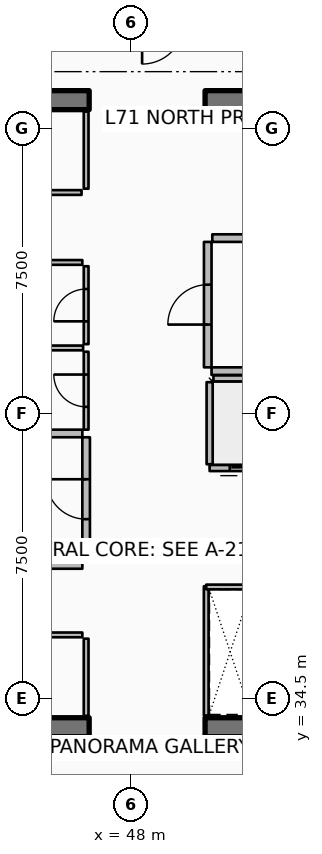
"""IFC4 building model, lengths in metres.
Left out: names, types, materials, properties, quantities, classifications, styles, units other than length and angle.
Written with IfcOpenShell. Run it as: python <this file> out.ifc"""

import sys

from ifc_helpers import new_model, si_unit, direction, frame, frame_2d, origin, place, context, subcontext, project, spatial, rectangle, extrude, element, fill, save


model = new_model("IFC4")
c1 = context("Model", 3, precision=1e-05, world=origin(), true_north=direction((0.0, 1.0)))
c2 = subcontext(c1, "Body", "Model", "MODEL_VIEW")
j1 = project(units=[si_unit("LENGTHUNIT", "METRE"), si_unit("PLANEANGLEUNIT", "RADIAN")], contexts=[c1])
p1 = place(None, origin())
s1 = spatial("IfcSite", under=j1, at=p1, CompositionType="ELEMENT")
p2 = place(p1, origin())
s2 = spatial("IfcBuilding", under=s1, at=p2, CompositionType="ELEMENT")
p3 = place(p2, frame((0.0, 0.0, 282.9)))
s3 = spatial("IfcBuildingStorey", under=s2, at=p3, CompositionType="ELEMENT", Elevation=282.9)
p4 = place(p3, frame((37.3, 33.75, 0.0), z_axis=(0.0, 0.0, 1.0), x_axis=(1.0, 0.0, 0.0)))
e1 = element("IfcWall", 1, at=p4, inside=s3, PredefinedType="SHEAR", context=c2, shape_type="SweptSolid", body=[
    extrude(rectangle(XDim=9.6, YDim=0.5, at=frame_2d((4.8, 0.0))), origin(), (0.0, 0.0, 1.0), 3.85),
])
p5 = place(p3, frame((49.95, 33.75, 0.0), z_axis=(0.0, 0.0, 1.0), x_axis=(1.0, 0.0, 0.0)))
e2 = element("IfcWall", 2, at=p5, inside=s3, PredefinedType="SHEAR", context=c2, shape_type="SweptSolid", body=[
    extrude(rectangle(XDim=9.6, YDim=0.5, at=frame_2d((4.8, 0.0))), origin(), (0.0, 0.0, 1.0), 3.85),
])
p6 = place(p3, frame((37.3, 50.25, 0.0), z_axis=(0.0, 0.0, 1.0), x_axis=(1.0, 0.0, 0.0)))
e3 = element("IfcWall", 3, at=p6, inside=s3, PredefinedType="SHEAR", context=c2, shape_type="SweptSolid", body=[
    extrude(rectangle(XDim=9.6, YDim=0.5, at=frame_2d((4.8, 0.0))), origin(), (0.0, 0.0, 1.0), 3.85),
])
p7 = place(p3, frame((49.95, 50.25, 0.0), z_axis=(0.0, 0.0, 1.0), x_axis=(1.0, 0.0, 0.0)))
e4 = element("IfcWall", 4, at=p7, inside=s3, PredefinedType="SHEAR", context=c2, shape_type="SweptSolid", body=[
    extrude(rectangle(XDim=9.6, YDim=0.5, at=frame_2d((4.8, 0.0))), origin(), (0.0, 0.0, 1.0), 3.85),
])
p8 = place(p3, frame((52.23, 40.57, 0.0), z_axis=(0.0, 0.0, 1.0), x_axis=(-1.0, 0.0, 0.0)))
e5 = element("IfcWall", 5, at=p8, inside=s3, PredefinedType="PARTITIONING", context=c2, shape_type="SweptSolid", body=[
    extrude(rectangle(XDim=2.16, YDim=0.16, at=frame_2d((1.08, 0.0))), origin(), (0.0, 0.0, 1.0), 3.59),
])
p9 = place(p8, frame((0.53, 0.0, 0.0)))
e6 = element("IfcOpeningElement", 6, at=p9, cuts=e5, PredefinedType="OPENING", context=c2, shape_type="SweptSolid", body=[
    extrude(rectangle(XDim=1.1, YDim=2.1, at=frame_2d((0.55, 1.05))), frame((0.0, 0.09, 0.0), z_axis=(0.0, -1.0, 0.0), x_axis=(1.0, 0.0, 0.0)), (0.0, 0.0, 1.0), 0.18),
])
p10 = place(p3, frame((50.07, 40.67, 0.0), z_axis=(0.0, 0.0, 1.0), x_axis=(0.0, 1.0, 0.0)))
e7 = element("IfcWall", 7, at=p10, inside=s3, PredefinedType="PARTITIONING", context=c2, shape_type="SweptSolid", body=[
    extrude(rectangle(XDim=2.16, YDim=0.16, at=frame_2d((1.08, 0.0))), origin(), (0.0, 0.0, 1.0), 3.59),
])
p11 = place(p3, frame((50.17, 42.93, 0.0), z_axis=(0.0, 0.0, 1.0), x_axis=(1.0, 0.0, 0.0)))
e8 = element("IfcWall", 8, at=p11, inside=s3, PredefinedType="PARTITIONING", context=c2, shape_type="SweptSolid", body=[
    extrude(rectangle(XDim=1.96, YDim=0.16, at=frame_2d((0.98, 0.0))), origin(), (0.0, 0.0, 1.0), 3.59),
])
p12 = place(p3, frame((46.82, 34.05, 0.0), z_axis=(0.0, 0.0, 1.0), x_axis=(0.0, 1.0, 0.0)))
e9 = element("IfcWall", 9, at=p12, inside=s3, PredefinedType="PARTITIONING", context=c2, shape_type="SweptSolid", body=[
    extrude(rectangle(XDim=2.03, YDim=0.125, at=frame_2d((1.015, 0.0))), origin(), (0.0, 0.0, 1.0), 3.03),
])
p13 = place(p3, frame((42.6, 36.18, 0.0), z_axis=(0.0, 0.0, 1.0), x_axis=(1.0, 0.0, 0.0)))
e10 = element("IfcWall", 10, at=p13, inside=s3, PredefinedType="PARTITIONING", context=c2, shape_type="SweptSolid", body=[
    extrude(rectangle(XDim=4.12, YDim=0.125, at=frame_2d((2.06, 0.0))), origin(), (0.0, 0.0, 1.0), 3.03),
])
p14 = place(p13, frame((1.635, 0.0, 0.0)))
e11 = element("IfcOpeningElement", 11, at=p14, cuts=e10, PredefinedType="OPENING", context=c2, shape_type="SweptSolid", body=[
    extrude(rectangle(XDim=0.85, YDim=2.06, at=frame_2d((0.425, 1.03))), frame((0.0, 0.073, 0.0), z_axis=(0.0, -1.0, 0.0), x_axis=(1.0, 0.0, 0.0)), (0.0, 0.0, 1.0), 0.145),
])
p15 = place(p3, frame((46.82, 47.92, 0.0), z_axis=(0.0, 0.0, 1.0), x_axis=(0.0, 1.0, 0.0)))
e12 = element("IfcWall", 12, at=p15, inside=s3, PredefinedType="PARTITIONING", context=c2, shape_type="SweptSolid", body=[
    extrude(rectangle(XDim=2.03, YDim=0.125, at=frame_2d((1.015, 0.0))), origin(), (0.0, 0.0, 1.0), 3.03),
])
p16 = place(p3, frame((37.92, 47.82, 0.0), z_axis=(0.0, 0.0, 1.0), x_axis=(1.0, 0.0, 0.0)))
e13 = element("IfcWall", 13, at=p16, inside=s3, PredefinedType="PARTITIONING", context=c2, shape_type="SweptSolid", body=[
    extrude(rectangle(XDim=8.78, YDim=0.125, at=frame_2d((4.39, 0.0))), origin(), (0.0, 0.0, 1.0), 3.03),
])
p17 = place(p16, frame((3.965, 0.0, 0.0)))
e14 = element("IfcOpeningElement", 14, at=p17, cuts=e13, PredefinedType="OPENING", context=c2, shape_type="SweptSolid", body=[
    extrude(rectangle(XDim=0.85, YDim=2.06, at=frame_2d((0.425, 1.03))), frame((0.0, 0.073, 0.0), z_axis=(0.0, -1.0, 0.0), x_axis=(1.0, 0.0, 0.0)), (0.0, 0.0, 1.0), 0.145),
])
p18 = place(p3, frame((41.35, 38.02, 0.0), z_axis=(0.0, 0.0, 1.0), x_axis=(1.0, 0.0, 0.0)))
e15 = element("IfcWall", 15, at=p18, inside=s3, PredefinedType="PARTITIONING", context=c2, shape_type="SweptSolid", body=[
    extrude(rectangle(XDim=5.37, YDim=0.2, at=frame_2d((2.685, 0.0))), origin(), (0.0, 0.0, 1.0), 3.59),
])
p19 = place(p3, frame((43.92, 41.48, 0.0), z_axis=(0.0, 0.0, 1.0), x_axis=(1.0, 0.0, 0.0)))
e16 = element("IfcWall", 16, at=p19, inside=s3, PredefinedType="PARTITIONING", context=c2, shape_type="SweptSolid", body=[
    extrude(rectangle(XDim=2.8, YDim=0.2, at=frame_2d((1.4, 0.0))), origin(), (0.0, 0.0, 1.0), 3.59),
])
p20 = place(p3, frame((46.82, 38.12, 0.0), z_axis=(0.0, 0.0, 1.0), x_axis=(0.0, 1.0, 0.0)))
e17 = element("IfcWall", 17, at=p20, inside=s3, PredefinedType="PARTITIONING", context=c2, shape_type="SweptSolid", body=[
    extrude(rectangle(XDim=3.26, YDim=0.2, at=frame_2d((1.63, 0.0))), origin(), (0.0, 0.0, 1.0), 3.59),
])
p21 = place(p20, frame((1.105, 0.0, 0.0)))
e18 = element("IfcOpeningElement", 18, at=p21, cuts=e17, PredefinedType="OPENING", context=c2, shape_type="SweptSolid", body=[
    extrude(rectangle(XDim=1.05, YDim=2.1, at=frame_2d((0.525, 1.05))), frame((0.0, 0.11, 0.0), z_axis=(0.0, -1.0, 0.0), x_axis=(1.0, 0.0, 0.0)), (0.0, 0.0, 1.0), 0.22),
])
p22 = place(p3, frame((50.12, 43.12, 0.0), z_axis=(0.0, 0.0, 1.0), x_axis=(1.0, 0.0, 0.0)))
e19 = element("IfcWall", 19, at=p22, inside=s3, PredefinedType="PARTITIONING", context=c2, shape_type="SweptSolid", body=[
    extrude(rectangle(XDim=8.88, YDim=0.2, at=frame_2d((4.44, 0.0))), origin(), (0.0, 0.0, 1.0), 3.59),
])
p23 = place(p3, frame((50.14, 46.62, 0.0), z_axis=(0.0, 0.0, 1.0), x_axis=(1.0, 0.0, 0.0)))
e20 = element("IfcWall", 20, at=p23, inside=s3, PredefinedType="PARTITIONING", context=c2, shape_type="SweptSolid", body=[
    extrude(rectangle(XDim=1.02, YDim=0.2, at=frame_2d((0.51, 0.0))), origin(), (0.0, 0.0, 1.0), 3.59),
])
p24 = place(p3, frame((50.02, 43.22, 0.0), z_axis=(0.0, 0.0, 1.0), x_axis=(0.0, 1.0, 0.0)))
e21 = element("IfcWall", 21, at=p24, inside=s3, PredefinedType="PARTITIONING", context=c2, shape_type="SweptSolid", body=[
    extrude(rectangle(XDim=3.3, YDim=0.2, at=frame_2d((1.65, 0.0))), origin(), (0.0, 0.0, 1.0), 3.59),
])
p25 = place(p24, frame((1.125, 0.0, 0.0)))
e22 = element("IfcOpeningElement", 22, at=p25, cuts=e21, PredefinedType="OPENING", context=c2, shape_type="SweptSolid", body=[
    extrude(rectangle(XDim=1.05, YDim=2.1, at=frame_2d((0.525, 1.05))), frame((0.0, 0.11, 0.0), z_axis=(0.0, -1.0, 0.0), x_axis=(1.0, 0.0, 0.0)), (0.0, 0.0, 1.0), 0.22),
])
p26 = place(p3, frame((41.36, 45.98, 0.0), z_axis=(0.0, 0.0, 1.0), x_axis=(1.0, 0.0, 0.0)))
e23 = element("IfcWall", 23, at=p26, inside=s3, PredefinedType="PARTITIONING", context=c2, shape_type="SweptSolid", body=[
    extrude(rectangle(XDim=5.36, YDim=0.125, at=frame_2d((2.68, 0.0))), origin(), (0.0, 0.0, 1.0), 3.03),
])
p27 = place(p3, frame((49.98, 34.06, 0.0), z_axis=(0.0, 0.0, 1.0), x_axis=(0.0, 1.0, 0.0)))
e24 = element("IfcWall", 24, at=p27, inside=s3, PredefinedType="PARTITIONING", context=c2, shape_type="SweptSolid", body=[
    extrude(rectangle(XDim=3.4, YDim=0.125, at=frame_2d((1.7, 0.0))), origin(), (0.0, 0.0, 1.0), 3.03),
])
p28 = place(p3, frame((49.98, 37.44, 0.0), z_axis=(0.0, 0.0, 1.0), x_axis=(1.0, 0.0, 0.0)))
e25 = element("IfcWall", 25, at=p28, inside=s3, PredefinedType="PARTITIONING", context=c2, shape_type="SweptSolid", body=[
    extrude(rectangle(XDim=1.26, YDim=0.125, at=frame_2d((0.63, 0.0))), origin(), (0.0, 0.0, 1.0), 3.03),
])
p29 = place(p3, frame((44.03, 43.73, 0.0), z_axis=(0.0, 0.0, 1.0), x_axis=(1.0, 0.0, 0.0)))
e26 = element("IfcWall", 26, at=p29, inside=s3, PredefinedType="PARTITIONING", context=c2, shape_type="SweptSolid", body=[
    extrude(rectangle(XDim=2.71, YDim=0.125, at=frame_2d((1.355, 0.0))), origin(), (0.0, 0.0, 1.0), 3.03),
])
p30 = place(p3, frame((46.82, 41.58, 0.0), z_axis=(0.0, 0.0, 1.0), x_axis=(0.0, 1.0, 0.0)))
e27 = element("IfcWall", 27, at=p30, inside=s3, PredefinedType="PARTITIONING", context=c2, shape_type="SweptSolid", body=[
    extrude(rectangle(XDim=2.05, YDim=0.125, at=frame_2d((1.025, 0.0))), origin(), (0.0, 0.0, 1.0), 3.03),
])
p31 = place(p30, frame((0.6, 0.0, 0.0)))
e28 = element("IfcOpeningElement", 28, at=p31, cuts=e27, PredefinedType="OPENING", context=c2, shape_type="SweptSolid", body=[
    extrude(rectangle(XDim=0.85, YDim=2.06, at=frame_2d((0.425, 1.03))), frame((0.0, 0.073, 0.0), z_axis=(0.0, -1.0, 0.0), x_axis=(1.0, 0.0, 0.0)), (0.0, 0.0, 1.0), 0.145),
])
p32 = place(p3, frame((46.82, 43.83, 0.0), z_axis=(0.0, 0.0, 1.0), x_axis=(0.0, 1.0, 0.0)))
e29 = element("IfcWall", 29, at=p32, inside=s3, PredefinedType="PARTITIONING", context=c2, shape_type="SweptSolid", body=[
    extrude(rectangle(XDim=2.05, YDim=0.125, at=frame_2d((1.025, 0.0))), origin(), (0.0, 0.0, 1.0), 3.03),
])
p33 = place(p32, frame((0.6, 0.0, 0.0)))
e30 = element("IfcOpeningElement", 30, at=p33, cuts=e29, PredefinedType="OPENING", context=c2, shape_type="SweptSolid", body=[
    extrude(rectangle(XDim=0.85, YDim=2.06, at=frame_2d((0.425, 1.03))), frame((0.0, 0.073, 0.0), z_axis=(0.0, -1.0, 0.0), x_axis=(1.0, 0.0, 0.0)), (0.0, 0.0, 1.0), 0.145),
])
p34 = place(p9, origin())
e31 = element("IfcDoor", 31, at=p34, inside=s3, OperationType="DOUBLE_DOOR_SLIDING", PredefinedType="DOOR", context=c2, shape_type="SweptSolid", body=[
    extrude(rectangle(XDim=1.1, YDim=2.1, at=frame_2d((0.55, 1.05))), frame((0.0, 0.025, 0.0), z_axis=(0.0, -1.0, 0.0), x_axis=(1.0, 0.0, 0.0)), (0.0, 0.0, 1.0), 0.05),
])
fill(e6, e31)
p35 = place(p21, origin())
e32 = element("IfcDoor", 32, at=p35, inside=s3, OperationType="SINGLE_SWING_RIGHT", PredefinedType="DOOR", context=c2, shape_type="SweptSolid", body=[
    extrude(rectangle(XDim=1.05, YDim=2.1, at=frame_2d((0.525, 1.05))), frame((0.0, 0.025, 0.0), z_axis=(0.0, -1.0, 0.0), x_axis=(1.0, 0.0, 0.0)), (0.0, 0.0, 1.0), 0.05),
])
fill(e18, e32)
p36 = place(p25, origin())
e33 = element("IfcDoor", 33, at=p36, inside=s3, OperationType="SINGLE_SWING_LEFT", PredefinedType="DOOR", context=c2, shape_type="SweptSolid", body=[
    extrude(rectangle(XDim=1.05, YDim=2.1, at=frame_2d((0.525, 1.05))), frame((0.0, 0.025, 0.0), z_axis=(0.0, -1.0, 0.0), x_axis=(1.0, 0.0, 0.0)), (0.0, 0.0, 1.0), 0.05),
])
fill(e22, e33)
p37 = place(p31, origin())
e34 = element("IfcDoor", 34, at=p37, inside=s3, OperationType="SINGLE_SWING_RIGHT", PredefinedType="DOOR", context=c2, shape_type="SweptSolid", body=[
    extrude(rectangle(XDim=0.85, YDim=2.06, at=frame_2d((0.425, 1.03))), frame((0.0, 0.025, 0.0), z_axis=(0.0, -1.0, 0.0), x_axis=(1.0, 0.0, 0.0)), (0.0, 0.0, 1.0), 0.05),
])
fill(e28, e34)
p38 = place(p33, origin())
e35 = element("IfcDoor", 35, at=p38, inside=s3, OperationType="SINGLE_SWING_LEFT", PredefinedType="DOOR", context=c2, shape_type="SweptSolid", body=[
    extrude(rectangle(XDim=0.85, YDim=2.06, at=frame_2d((0.425, 1.03))), frame((0.0, 0.025, 0.0), z_axis=(0.0, -1.0, 0.0), x_axis=(1.0, 0.0, 0.0)), (0.0, 0.0, 1.0), 0.05),
])
fill(e30, e35)
save(model, sys.argv[1])
